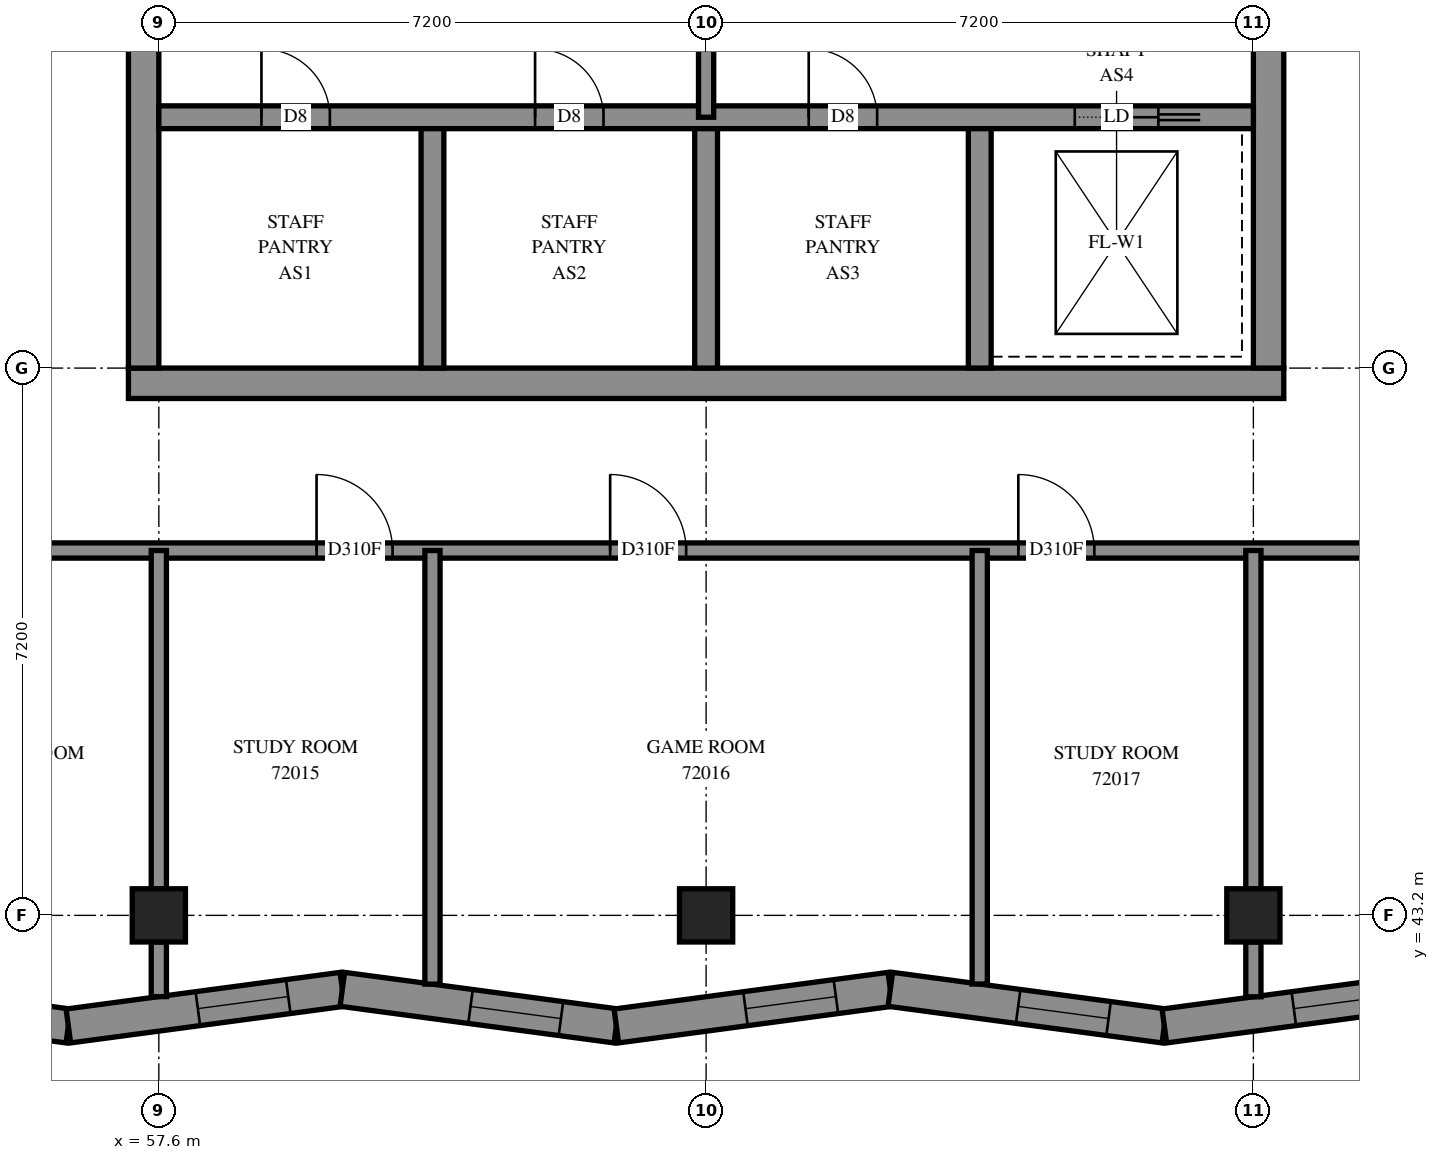
"""IFC4 building model, lengths in metres.
Left out: names, types, materials, properties, quantities, classifications, styles, units other than length and angle.
Written with IfcOpenShell. Run it as: python <this file> out.ifc"""

import sys

from ifc_helpers import new_model, si_unit, direction, frame, frame_2d, origin, origin_2d, place, context, subcontext, project, spatial, polyline, rectangle, outline, extrude, element, fill, save


model = new_model("IFC4")
c1 = context("Model", 3, precision=1e-05, world=origin(), true_north=direction((0.0, 1.0)))
c2 = subcontext(c1, "Body", "Model", "MODEL_VIEW")
j1 = project(units=[si_unit("LENGTHUNIT", "METRE"), si_unit("PLANEANGLEUNIT", "RADIAN")], contexts=[c1])
p1 = place(None, origin())
s1 = spatial("IfcSite", under=j1, at=p1, CompositionType="ELEMENT")
p2 = place(p1, origin())
s2 = spatial("IfcBuilding", under=s1, at=p2, CompositionType="ELEMENT")
p3 = place(p2, frame((0.0, 0.0, 264.2)))
s3 = spatial("IfcBuildingStorey", under=s2, at=p3, CompositionType="ELEMENT", Elevation=264.2)
for number, where, z_axis, x_axis in (
    (1, (57.6, 43.2, 0.0), (0.0, 0.0, 1.0), (1.0, 0.0, 0.0)),
    (2, (64.8, 43.2, 0.0), (0.0, 0.0, 1.0), (1.0, 0.0, 0.0)),
    (3, (72.0, 43.2, 0.0), (0.0, 0.0, 1.0), (1.0, 0.0, 0.0)),
):
    element("IfcColumn", number, at=place(p3, frame(where, z_axis=z_axis, x_axis=x_axis)), inside=s3, PredefinedType="COLUMN", context=c2, shape_type="SweptSolid", body=[
        extrude(rectangle(XDim=0.7, YDim=0.7, at=origin_2d()), origin(), (0.0, 0.0, 1.0), 3.1),
    ])
p4 = place(p3, frame((57.2, 50.2, -0.3), z_axis=(0.0, 0.0, 1.0), x_axis=(1.0, 0.0, 0.0)))
e4 = element("IfcWall", 4, at=p4, inside=s3, PredefinedType="SHEAR", context=c2, shape_type="SweptSolid", body=[
    extrude(rectangle(XDim=15.2, YDim=0.4, at=frame_2d((7.6, 0.0))), origin(), (0.0, 0.0, 1.0), 2.7),
])
p5 = place(p3, frame((57.4, 50.4, -0.3), z_axis=(0.0, 0.0, 1.0), x_axis=(0.0, 1.0, 0.0)))
e5 = element("IfcWall", 5, at=p5, inside=s3, PredefinedType="SHEAR", context=c2, shape_type="SweptSolid", body=[
    extrude(rectangle(XDim=14.4, YDim=0.4, at=frame_2d((7.2, 0.0))), origin(), (0.0, 0.0, 1.0), 2.7),
])
p6 = place(p5, frame((4.55, 0.0, 0.3)))
e6 = element("IfcOpeningElement", 6, at=p6, cuts=e5, PredefinedType="OPENING", context=c2, shape_type="SweptSolid", body=[
    extrude(rectangle(XDim=1.1, YDim=2.1, at=frame_2d((0.55, 1.05))), frame((0.0, 0.21, 0.0), z_axis=(0.0, -1.0, 0.0), x_axis=(1.0, 0.0, 0.0)), (0.0, 0.0, 1.0), 0.42),
])
p7 = place(p5, frame((11.35, 0.0, 0.3)))
e7 = element("IfcOpeningElement", 7, at=p7, cuts=e5, PredefinedType="OPENING", context=c2, shape_type="SweptSolid", body=[
    extrude(rectangle(XDim=1.1, YDim=2.1, at=frame_2d((0.55, 1.05))), frame((0.0, 0.21, 0.0), z_axis=(0.0, -1.0, 0.0), x_axis=(1.0, 0.0, 0.0)), (0.0, 0.0, 1.0), 0.42),
])
p8 = place(p3, frame((72.2, 50.4, -0.3), z_axis=(0.0, 0.0, 1.0), x_axis=(0.0, 1.0, 0.0)))
e8 = element("IfcWall", 8, at=p8, inside=s3, PredefinedType="SHEAR", context=c2, shape_type="SweptSolid", body=[
    extrude(rectangle(XDim=14.4, YDim=0.4, at=frame_2d((7.2, 0.0))), origin(), (0.0, 0.0, 1.0), 2.7),
])
p9 = place(p8, frame((4.55, 0.0, 0.3)))
e9 = element("IfcOpeningElement", 9, at=p9, cuts=e8, PredefinedType="OPENING", context=c2, shape_type="SweptSolid", body=[
    extrude(rectangle(XDim=1.1, YDim=2.1, at=frame_2d((0.55, 1.05))), frame((0.0, 0.21, 0.0), z_axis=(0.0, -1.0, 0.0), x_axis=(1.0, 0.0, 0.0)), (0.0, 0.0, 1.0), 0.42),
])
p10 = place(p8, frame((11.35, 0.0, 0.3)))
e10 = element("IfcOpeningElement", 10, at=p10, cuts=e8, PredefinedType="OPENING", context=c2, shape_type="SweptSolid", body=[
    extrude(rectangle(XDim=1.1, YDim=2.1, at=frame_2d((0.55, 1.05))), frame((0.0, 0.21, 0.0), z_axis=(0.0, -1.0, 0.0), x_axis=(1.0, 0.0, 0.0)), (0.0, 0.0, 1.0), 0.42),
])
for number, where, z_axis, x_axis in (
    (11, (61.2, 50.4, 0.0), (0.0, 0.0, 1.0), (0.0, 1.0, 0.0)),
    (12, (64.8, 50.4, 0.0), (0.0, 0.0, 1.0), (0.0, 1.0, 0.0)),
    (13, (68.4, 50.4, 0.0), (0.0, 0.0, 1.0), (0.0, 1.0, 0.0)),
):
    element("IfcWall", number, at=place(p3, frame(where, z_axis=z_axis, x_axis=x_axis)), inside=s3, PredefinedType="SOLIDWALL", context=c2, shape_type="SweptSolid", body=[
        extrude(rectangle(XDim=3.3, YDim=0.3, at=frame_2d((1.65, 0.0))), origin(), (0.0, 0.0, 1.0), 3.1),
    ])
p11 = place(p3, frame((57.6, 53.7, 0.0), z_axis=(0.0, 0.0, 1.0), x_axis=(1.0, 0.0, 0.0)))
e14 = element("IfcWall", 14, at=p11, inside=s3, PredefinedType="SOLIDWALL", context=c2, shape_type="SweptSolid", body=[
    extrude(rectangle(XDim=14.4, YDim=0.3, at=frame_2d((7.2, 0.0))), origin(), (0.0, 0.0, 1.0), 3.1),
])
p12 = place(p11, frame((1.35, 0.0, 0.0)))
e15 = element("IfcOpeningElement", 15, at=p12, cuts=e14, PredefinedType="OPENING", context=c2, shape_type="SweptSolid", body=[
    extrude(rectangle(XDim=0.9, YDim=2.1, at=frame_2d((0.45, 1.05))), frame((0.0, 0.16, 0.0), z_axis=(0.0, -1.0, 0.0), x_axis=(1.0, 0.0, 0.0)), (0.0, 0.0, 1.0), 0.32),
])
p13 = place(p11, frame((4.95, 0.0, 0.0)))
e16 = element("IfcOpeningElement", 16, at=p13, cuts=e14, PredefinedType="OPENING", context=c2, shape_type="SweptSolid", body=[
    extrude(rectangle(XDim=0.9, YDim=2.1, at=frame_2d((0.45, 1.05))), frame((0.0, 0.16, 0.0), z_axis=(0.0, -1.0, 0.0), x_axis=(1.0, 0.0, 0.0)), (0.0, 0.0, 1.0), 0.32),
])
p14 = place(p11, frame((8.55, 0.0, 0.0)))
e17 = element("IfcOpeningElement", 17, at=p14, cuts=e14, PredefinedType="OPENING", context=c2, shape_type="SweptSolid", body=[
    extrude(rectangle(XDim=0.9, YDim=2.1, at=frame_2d((0.45, 1.05))), frame((0.0, 0.16, 0.0), z_axis=(0.0, -1.0, 0.0), x_axis=(1.0, 0.0, 0.0)), (0.0, 0.0, 1.0), 0.32),
])
p15 = place(p11, frame((12.05, 0.0, 0.0)))
e18 = element("IfcOpeningElement", 18, at=p15, cuts=e14, PredefinedType="OPENING", context=c2, shape_type="SweptSolid", body=[
    extrude(rectangle(XDim=1.1, YDim=2.1, at=frame_2d((0.55, 1.05))), frame((0.0, 0.16, 0.0), z_axis=(0.0, -1.0, 0.0), x_axis=(1.0, 0.0, 0.0)), (0.0, 0.0, 1.0), 0.32),
])
p16 = place(p3, frame((52.786, 42.229, 0.0), z_axis=(0.0, 0.0, 1.0), x_axis=(0.991180049, -0.1325221131, 0.0)))
e19 = element("IfcWall", 19, at=p16, inside=s3, PredefinedType="SOLIDWALL", context=c2, shape_type="SweptSolid", body=[
    extrude(outline(polyline([(0.049, -0.225), (3.685, -0.225), (3.625, 0.225), (-0.049, 0.225), (0.049, -0.225)])), origin(), (0.0, 0.0, 1.0), 3.1),
])
p17 = place(p16, frame((1.725, 0.0, 0.45)))
e20 = element("IfcOpeningElement", 20, at=p17, cuts=e19, PredefinedType="OPENING", context=c2, shape_type="SweptSolid", body=[
    extrude(rectangle(XDim=1.2, YDim=2.55, at=frame_2d((0.6, 1.275))), frame((0.0, 0.235, 0.0), z_axis=(0.0, -1.0, 0.0), x_axis=(1.0, 0.0, 0.0)), (0.0, 0.0, 1.0), 0.47),
])
p18 = place(p3, frame((56.41, 41.745, 0.0), z_axis=(0.0, 0.0, 1.0), x_axis=(0.991178361, 0.132534738, 0.0)))
e21 = element("IfcWall", 21, at=p18, inside=s3, PredefinedType="SOLIDWALL", context=c2, shape_type="SweptSolid", body=[
    extrude(outline(polyline([(-0.03, -0.225), (3.607, -0.225), (3.667, 0.225), (0.03, 0.225), (-0.03, -0.225)])), origin(), (0.0, 0.0, 1.0), 3.1),
])
p19 = place(p18, frame((1.719, 0.0, 0.45)))
e22 = element("IfcOpeningElement", 22, at=p19, cuts=e21, PredefinedType="OPENING", context=c2, shape_type="SweptSolid", body=[
    extrude(rectangle(XDim=1.2, YDim=2.55, at=frame_2d((0.6, 1.275))), frame((0.0, 0.235, 0.0), z_axis=(0.0, -1.0, 0.0), x_axis=(1.0, 0.0, 0.0)), (0.0, 0.0, 1.0), 0.47),
])
p20 = place(p3, frame((60.014, 42.227, 0.0), z_axis=(0.0, 0.0, 1.0), x_axis=(0.991178361, -0.132534738, 0.0)))
e23 = element("IfcWall", 23, at=p20, inside=s3, PredefinedType="SOLIDWALL", context=c2, shape_type="SweptSolid", body=[
    extrude(outline(polyline([(0.03, -0.225), (3.667, -0.225), (3.607, 0.225), (-0.03, 0.225), (0.03, -0.225)])), origin(), (0.0, 0.0, 1.0), 3.1),
])
p21 = place(p20, frame((1.702, 0.0, 0.45)))
e24 = element("IfcOpeningElement", 24, at=p21, cuts=e23, PredefinedType="OPENING", context=c2, shape_type="SweptSolid", body=[
    extrude(rectangle(XDim=1.2, YDim=2.55, at=frame_2d((0.6, 1.275))), frame((0.0, 0.235, 0.0), z_axis=(0.0, -1.0, 0.0), x_axis=(1.0, 0.0, 0.0)), (0.0, 0.0, 1.0), 0.47),
])
p22 = place(p3, frame((63.619, 41.745, 0.0), z_axis=(0.0, 0.0, 1.0), x_axis=(0.9911788439, 0.1325311259, 0.0)))
e25 = element("IfcWall", 25, at=p22, inside=s3, PredefinedType="SOLIDWALL", context=c2, shape_type="SweptSolid", body=[
    extrude(outline(polyline([(-0.03, -0.225), (3.607, -0.225), (3.667, 0.225), (0.03, 0.225), (-0.03, -0.225)])), origin(), (0.0, 0.0, 1.0), 3.1),
])
p23 = place(p22, frame((1.714, 0.0, 0.45)))
e26 = element("IfcOpeningElement", 26, at=p23, cuts=e25, PredefinedType="OPENING", context=c2, shape_type="SweptSolid", body=[
    extrude(rectangle(XDim=1.2, YDim=2.55, at=frame_2d((0.6, 1.275))), frame((0.0, 0.235, 0.0), z_axis=(0.0, -1.0, 0.0), x_axis=(1.0, 0.0, 0.0)), (0.0, 0.0, 1.0), 0.47),
])
p24 = place(p3, frame((67.224, 42.227, 0.0), z_axis=(0.0, 0.0, 1.0), x_axis=(0.991178361, -0.132534738, 0.0)))
e27 = element("IfcWall", 27, at=p24, inside=s3, PredefinedType="SOLIDWALL", context=c2, shape_type="SweptSolid", body=[
    extrude(outline(polyline([(0.03, -0.225), (3.667, -0.225), (3.607, 0.225), (-0.03, 0.225), (0.03, -0.225)])), origin(), (0.0, 0.0, 1.0), 3.1),
])
p25 = place(p24, frame((1.697, 0.0, 0.45)))
e28 = element("IfcOpeningElement", 28, at=p25, cuts=e27, PredefinedType="OPENING", context=c2, shape_type="SweptSolid", body=[
    extrude(rectangle(XDim=1.2, YDim=2.55, at=frame_2d((0.6, 1.275))), frame((0.0, 0.235, 0.0), z_axis=(0.0, -1.0, 0.0), x_axis=(1.0, 0.0, 0.0)), (0.0, 0.0, 1.0), 0.47),
])
p26 = place(p3, frame((70.828, 41.745, 0.0), z_axis=(0.0, 0.0, 1.0), x_axis=(0.991180049, 0.1325221131, 0.0)))
e29 = element("IfcWall", 29, at=p26, inside=s3, PredefinedType="SOLIDWALL", context=c2, shape_type="SweptSolid", body=[
    extrude(outline(polyline([(-0.03, -0.225), (3.607, -0.225), (3.704, 0.225), (0.03, 0.225), (-0.03, -0.225)])), origin(), (0.0, 0.0, 1.0), 3.1),
])
p27 = place(p26, frame((1.719, 0.0, 0.45)))
e30 = element("IfcOpeningElement", 30, at=p27, cuts=e29, PredefinedType="OPENING", context=c2, shape_type="SweptSolid", body=[
    extrude(rectangle(XDim=1.2, YDim=2.55, at=frame_2d((0.6, 1.275))), frame((0.0, 0.235, 0.0), z_axis=(0.0, -1.0, 0.0), x_axis=(1.0, 0.0, 0.0)), (0.0, 0.0, 1.0), 0.47),
])
p28 = place(p3, frame((64.8, 53.7, 0.0), z_axis=(0.0, 0.0, 1.0), x_axis=(0.0, 1.0, 0.0)))
e31 = element("IfcWall", 31, at=p28, inside=s3, PredefinedType="PARTITIONING", context=c2, shape_type="SweptSolid", body=[
    extrude(rectangle(XDim=3.6, YDim=0.2, at=frame_2d((1.8, 0.0))), origin(), (0.0, 0.0, 1.0), 3.1),
])
p29 = place(p3, frame((55.2, 48.0, 0.0), z_axis=(0.0, 0.0, 1.0), x_axis=(1.0, 0.0, 0.0)))
e32 = element("IfcWall", 32, at=p29, inside=s3, PredefinedType="PARTITIONING", context=c2, shape_type="SweptSolid", body=[
    extrude(rectangle(XDim=19.15, YDim=0.2, at=frame_2d((9.575, 0.0))), origin(), (0.0, 0.0, 1.0), 3.1),
])
p30 = place(p29, frame((4.475, 0.0, 0.0)))
e33 = element("IfcOpeningElement", 33, at=p30, cuts=e32, PredefinedType="OPENING", context=c2, shape_type="SweptSolid", body=[
    extrude(rectangle(XDim=1.0, YDim=2.1, at=frame_2d((0.5, 1.05))), frame((0.0, 0.11, 0.0), z_axis=(0.0, -1.0, 0.0), x_axis=(1.0, 0.0, 0.0)), (0.0, 0.0, 1.0), 0.22),
])
p31 = place(p29, frame((8.338, 0.0, 0.0)))
e34 = element("IfcOpeningElement", 34, at=p31, cuts=e32, PredefinedType="OPENING", context=c2, shape_type="SweptSolid", body=[
    extrude(rectangle(XDim=1.0, YDim=2.1, at=frame_2d((0.5, 1.05))), frame((0.0, 0.11, 0.0), z_axis=(0.0, -1.0, 0.0), x_axis=(1.0, 0.0, 0.0)), (0.0, 0.0, 1.0), 0.22),
])
p32 = place(p29, frame((13.707, 0.0, 0.0)))
e35 = element("IfcOpeningElement", 35, at=p32, cuts=e32, PredefinedType="OPENING", context=c2, shape_type="SweptSolid", body=[
    extrude(rectangle(XDim=1.0, YDim=2.1, at=frame_2d((0.5, 1.05))), frame((0.0, 0.11, 0.0), z_axis=(0.0, -1.0, 0.0), x_axis=(1.0, 0.0, 0.0)), (0.0, 0.0, 1.0), 0.22),
])
p33 = place(p3, frame((61.2, 42.295, 0.0), z_axis=(0.0, 0.0, 1.0), x_axis=(0.0, 1.0, 0.0)))
e36 = element("IfcWall", 36, at=p33, inside=s3, PredefinedType="PARTITIONING", context=c2, shape_type="SweptSolid", body=[
    extrude(rectangle(XDim=5.705, YDim=0.2, at=frame_2d((2.852, 0.0))), origin(), (0.0, 0.0, 1.0), 3.1),
])
p34 = place(p3, frame((68.4, 42.297, 0.0), z_axis=(0.0, 0.0, 1.0), x_axis=(0.0, 1.0, 0.0)))
e37 = element("IfcWall", 37, at=p34, inside=s3, PredefinedType="PARTITIONING", context=c2, shape_type="SweptSolid", body=[
    extrude(rectangle(XDim=5.703, YDim=0.2, at=frame_2d((2.852, 0.0))), origin(), (0.0, 0.0, 1.0), 3.1),
])
for number, where, z_axis, x_axis in (
    (38, (57.6, 43.55, 0.0), (0.0, 0.0, 1.0), (0.0, 1.0, 0.0)),
    (39, (72.0, 43.55, 0.0), (0.0, 0.0, 1.0), (0.0, 1.0, 0.0)),
):
    element("IfcWall", number, at=place(p3, frame(where, z_axis=z_axis, x_axis=x_axis)), inside=s3, PredefinedType="PARTITIONING", context=c2, shape_type="SweptSolid", body=[
        extrude(rectangle(XDim=4.45, YDim=0.2, at=frame_2d((2.225, 0.0))), origin(), (0.0, 0.0, 1.0), 3.1),
    ])
p35 = place(p3, frame((72.0, 42.129, 0.0), z_axis=(0.0, 0.0, 1.0), x_axis=(0.0, 1.0, 0.0)))
e40 = element("IfcWall", 40, at=p35, inside=s3, PredefinedType="PARTITIONING", context=c2, shape_type="SweptSolid", body=[
    extrude(rectangle(XDim=0.721, YDim=0.2, at=frame_2d((0.361, 0.0))), origin(), (0.0, 0.0, 1.0), 3.1),
])
p36 = place(p3, frame((57.6, 42.131, 0.0), z_axis=(0.0, 0.0, 1.0), x_axis=(0.0, 1.0, 0.0)))
e41 = element("IfcWall", 41, at=p36, inside=s3, PredefinedType="PARTITIONING", context=c2, shape_type="SweptSolid", body=[
    extrude(rectangle(XDim=0.719, YDim=0.2, at=frame_2d((0.359, 0.0))), origin(), (0.0, 0.0, 1.0), 3.1),
])
p37 = place(p19, origin())
e42 = element("IfcWindow", 42, at=p37, inside=s3, PartitioningType="SINGLE_PANEL", PredefinedType="WINDOW", context=c2, shape_type="SweptSolid", body=[
    extrude(rectangle(XDim=1.2, YDim=2.55, at=frame_2d((0.6, 1.275))), frame((0.0, 0.205, 0.0), z_axis=(0.0, -1.0, 0.0), x_axis=(1.0, 0.0, 0.0)), (0.0, 0.0, 1.0), 0.06),
])
fill(e22, e42)
p38 = place(p21, origin())
e43 = element("IfcWindow", 43, at=p38, inside=s3, PartitioningType="SINGLE_PANEL", PredefinedType="WINDOW", context=c2, shape_type="SweptSolid", body=[
    extrude(rectangle(XDim=1.2, YDim=2.55, at=frame_2d((0.6, 1.275))), frame((0.0, 0.205, 0.0), z_axis=(0.0, -1.0, 0.0), x_axis=(1.0, 0.0, 0.0)), (0.0, 0.0, 1.0), 0.06),
])
fill(e24, e43)
p39 = place(p23, origin())
e44 = element("IfcWindow", 44, at=p39, inside=s3, PartitioningType="SINGLE_PANEL", PredefinedType="WINDOW", context=c2, shape_type="SweptSolid", body=[
    extrude(rectangle(XDim=1.2, YDim=2.55, at=frame_2d((0.6, 1.275))), frame((0.0, 0.205, 0.0), z_axis=(0.0, -1.0, 0.0), x_axis=(1.0, 0.0, 0.0)), (0.0, 0.0, 1.0), 0.06),
])
fill(e26, e44)
p40 = place(p25, origin())
e45 = element("IfcWindow", 45, at=p40, inside=s3, PartitioningType="SINGLE_PANEL", PredefinedType="WINDOW", context=c2, shape_type="SweptSolid", body=[
    extrude(rectangle(XDim=1.2, YDim=2.55, at=frame_2d((0.6, 1.275))), frame((0.0, 0.205, 0.0), z_axis=(0.0, -1.0, 0.0), x_axis=(1.0, 0.0, 0.0)), (0.0, 0.0, 1.0), 0.06),
])
fill(e28, e45)
p41 = place(p27, origin())
e46 = element("IfcWindow", 46, at=p41, inside=s3, PartitioningType="SINGLE_PANEL", PredefinedType="WINDOW", context=c2, shape_type="SweptSolid", body=[
    extrude(rectangle(XDim=1.2, YDim=2.55, at=frame_2d((0.6, 1.275))), frame((0.0, 0.205, 0.0), z_axis=(0.0, -1.0, 0.0), x_axis=(1.0, 0.0, 0.0)), (0.0, 0.0, 1.0), 0.06),
])
fill(e30, e46)
p42 = place(p12, origin())
e47 = element("IfcDoor", 47, at=p42, inside=s3, OperationType="SINGLE_SWING_LEFT", PredefinedType="DOOR", context=c2, shape_type="SweptSolid", body=[
    extrude(rectangle(XDim=0.9, YDim=2.1, at=frame_2d((0.45, 1.05))), frame((0.0, 0.025, 0.0), z_axis=(0.0, -1.0, 0.0), x_axis=(1.0, 0.0, 0.0)), (0.0, 0.0, 1.0), 0.05),
])
fill(e15, e47)
p43 = place(p13, origin())
e48 = element("IfcDoor", 48, at=p43, inside=s3, OperationType="SINGLE_SWING_LEFT", PredefinedType="DOOR", context=c2, shape_type="SweptSolid", body=[
    extrude(rectangle(XDim=0.9, YDim=2.1, at=frame_2d((0.45, 1.05))), frame((0.0, 0.025, 0.0), z_axis=(0.0, -1.0, 0.0), x_axis=(1.0, 0.0, 0.0)), (0.0, 0.0, 1.0), 0.05),
])
fill(e16, e48)
p44 = place(p14, origin())
e49 = element("IfcDoor", 49, at=p44, inside=s3, OperationType="SINGLE_SWING_LEFT", PredefinedType="DOOR", context=c2, shape_type="SweptSolid", body=[
    extrude(rectangle(XDim=0.9, YDim=2.1, at=frame_2d((0.45, 1.05))), frame((0.0, 0.025, 0.0), z_axis=(0.0, -1.0, 0.0), x_axis=(1.0, 0.0, 0.0)), (0.0, 0.0, 1.0), 0.05),
])
fill(e17, e49)
p45 = place(p15, origin())
e50 = element("IfcDoor", 50, at=p45, inside=s3, OperationType="SLIDING_TO_RIGHT", PredefinedType="DOOR", context=c2, shape_type="SweptSolid", body=[
    extrude(rectangle(XDim=1.1, YDim=2.1, at=frame_2d((0.55, 1.05))), frame((0.0, 0.025, 0.0), z_axis=(0.0, -1.0, 0.0), x_axis=(1.0, 0.0, 0.0)), (0.0, 0.0, 1.0), 0.05),
])
fill(e18, e50)
p46 = place(p30, origin())
e51 = element("IfcDoor", 51, at=p46, inside=s3, OperationType="SINGLE_SWING_LEFT", PredefinedType="DOOR", context=c2, shape_type="SweptSolid", body=[
    extrude(rectangle(XDim=1.0, YDim=2.1, at=frame_2d((0.5, 1.05))), frame((0.0, 0.025, 0.0), z_axis=(0.0, -1.0, 0.0), x_axis=(1.0, 0.0, 0.0)), (0.0, 0.0, 1.0), 0.05),
])
fill(e33, e51)
p47 = place(p31, origin())
e52 = element("IfcDoor", 52, at=p47, inside=s3, OperationType="SINGLE_SWING_RIGHT", PredefinedType="DOOR", context=c2, shape_type="SweptSolid", body=[
    extrude(rectangle(XDim=1.0, YDim=2.1, at=frame_2d((0.5, 1.05))), frame((0.0, 0.025, 0.0), z_axis=(0.0, -1.0, 0.0), x_axis=(1.0, 0.0, 0.0)), (0.0, 0.0, 1.0), 0.05),
])
fill(e34, e52)
p48 = place(p32, origin())
e53 = element("IfcDoor", 53, at=p48, inside=s3, OperationType="SINGLE_SWING_RIGHT", PredefinedType="DOOR", context=c2, shape_type="SweptSolid", body=[
    extrude(rectangle(XDim=1.0, YDim=2.1, at=frame_2d((0.5, 1.05))), frame((0.0, 0.025, 0.0), z_axis=(0.0, -1.0, 0.0), x_axis=(1.0, 0.0, 0.0)), (0.0, 0.0, 1.0), 0.05),
])
fill(e35, e53)
save(model, sys.argv[1])
